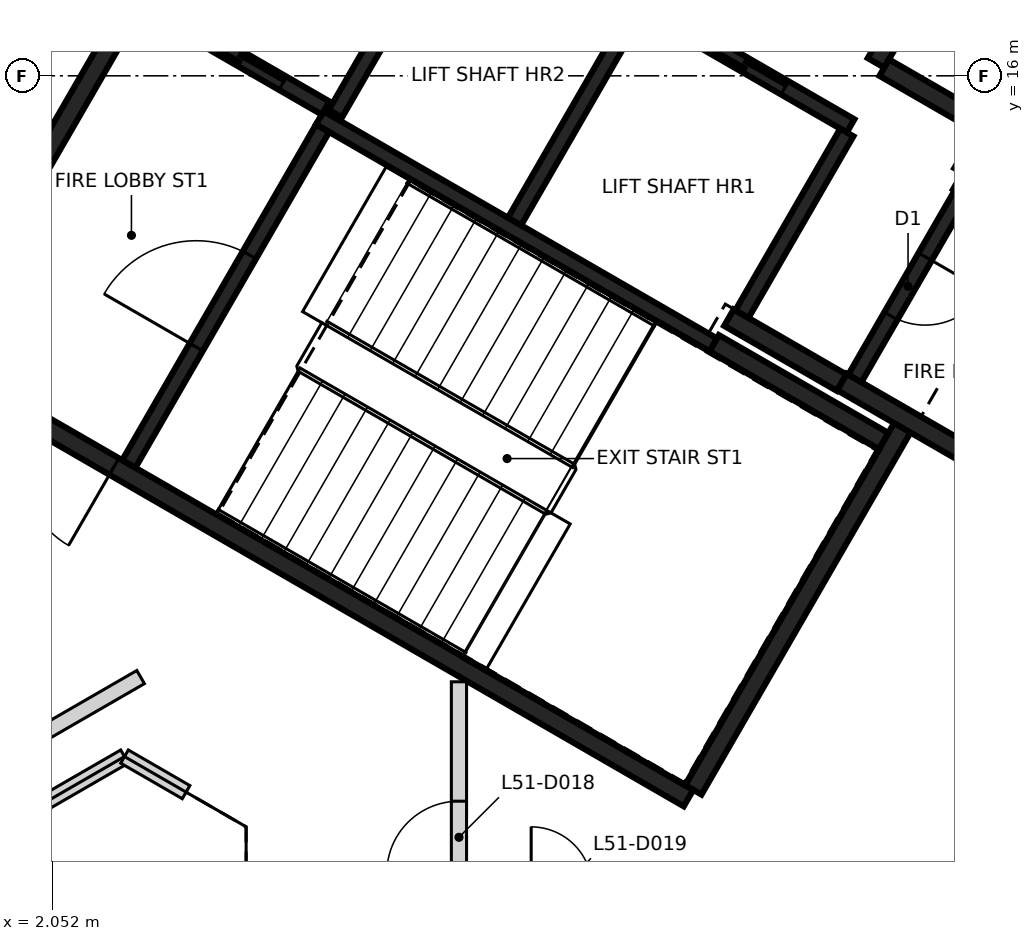
"""IFC4 building model, lengths in metres.
Left out: names, types, materials, properties, quantities, classifications, styles, units other than length and angle.
Written with IfcOpenShell. Run it as: python <this file> out.ifc"""

import sys

from ifc_helpers import new_model, si_unit, direction, frame, frame_2d, origin, place, context, subcontext, project, spatial, rectangle, extrude, element, fill, save


model = new_model("IFC4")
c1 = context("Model", 3, precision=1e-05, world=origin(), true_north=direction((0.0, 1.0)))
c2 = subcontext(c1, "Body", "Model", "MODEL_VIEW")
j1 = project(units=[si_unit("LENGTHUNIT", "METRE"), si_unit("PLANEANGLEUNIT", "RADIAN")], contexts=[c1])
p1 = place(None, origin())
s1 = spatial("IfcSite", under=j1, at=p1, CompositionType="ELEMENT")
p2 = place(p1, origin())
s2 = spatial("IfcBuilding", under=s1, at=p2, CompositionType="ELEMENT")
p3 = place(p2, frame((0.0, 0.0, 204.4)))
s3 = spatial("IfcBuildingStorey", under=s2, at=p3, CompositionType="ELEMENT", Elevation=204.4)
p4 = place(p3, frame((10.42, 6.498, 0.0), z_axis=(0.0, 0.0, 1.0), x_axis=(-0.866021906294, 0.500006057782, 0.0)))
e1 = element("IfcWall", 1, at=p4, inside=s3, PredefinedType="SHEAR", context=c2, shape_type="SweptSolid", body=[
    extrude(rectangle(XDim=11.55, YDim=0.25, at=frame_2d((5.775, 0.0))), origin(), (0.0, 0.0, 1.0), 3.25),
])
p5 = place(p4, frame((10.025, 0.0, 0.0)))
e2 = element("IfcOpeningElement", 2, at=p5, cuts=e1, PredefinedType="OPENING", context=c2, shape_type="SweptSolid", body=[
    extrude(rectangle(XDim=1.2, YDim=2.1, at=frame_2d((0.6, 1.05))), frame((0.0, 0.135, 0.0), z_axis=(0.0, -1.0, 0.0), x_axis=(1.0, 0.0, 0.0)), (0.0, 0.0, 1.0), 0.27),
])
p6 = place(p4, frame((8.725, 0.0, 0.0)))
e3 = element("IfcOpeningElement", 3, at=p6, cuts=e1, PredefinedType="OPENING", context=c2, shape_type="SweptSolid", body=[
    extrude(rectangle(XDim=1.2, YDim=2.1, at=frame_2d((0.6, 1.05))), frame((0.0, 0.135, 0.0), z_axis=(0.0, -1.0, 0.0), x_axis=(1.0, 0.0, 0.0)), (0.0, 0.0, 1.0), 0.27),
])
p7 = place(p3, frame((0.48, 12.381, 0.0), z_axis=(0.0, 0.0, 1.0), x_axis=(0.49999885962, 0.866026062182, 0.0)))
e4 = element("IfcWall", 4, at=p7, inside=s3, PredefinedType="SHEAR", context=c2, shape_type="SweptSolid", body=[
    extrude(rectangle(XDim=5.225, YDim=0.25, at=frame_2d((2.612, 0.0))), origin(), (0.0, 0.0, 1.0), 3.25),
])
p8 = place(p3, frame((13.238, 11.378, 0.0), z_axis=(0.0, 0.0, 1.0), x_axis=(-0.500008851346, -0.866020293397, 0.0)))
e5 = element("IfcWall", 5, at=p8, inside=s3, PredefinedType="SHEAR", context=c2, shape_type="SweptSolid", body=[
    extrude(rectangle(XDim=5.51, YDim=0.25, at=frame_2d((2.755, 0.0))), origin(), (0.0, 0.0, 1.0), 3.25),
])
p9 = place(p3, frame((14.918, 10.54, 0.0), z_axis=(0.0, 0.0, 1.0), x_axis=(-0.866063538972, 0.499933942099, 0.0)))
e6 = element("IfcWall", 6, at=p9, inside=s3, PredefinedType="SHEAR", context=c2, shape_type="SweptSolid", body=[
    extrude(rectangle(XDim=2.865, YDim=0.25, at=frame_2d((1.432, 0.0))), origin(), (0.0, 0.0, 1.0), 3.25),
])
p10 = place(p3, frame((13.963, 14.614, 0.0), z_axis=(0.0, 0.0, 1.0), x_axis=(0.866042235819, -0.499970844928, 0.0)))
e7 = element("IfcWall", 7, at=p10, inside=s3, PredefinedType="SHEAR", context=c2, shape_type="SweptSolid", body=[
    extrude(rectangle(XDim=2.865, YDim=0.25, at=frame_2d((1.432, 0.0))), origin(), (0.0, 0.0, 1.0), 3.25),
])
p11 = place(p3, frame((10.757, 12.481, 0.0), z_axis=(0.0, 0.0, 1.0), x_axis=(0.866022940537, -0.500004266446, 0.0)))
e8 = element("IfcWall", 8, at=p11, inside=s3, PredefinedType="SHEAR", context=c2, shape_type="SweptSolid", body=[
    extrude(rectangle(XDim=2.575, YDim=0.25, at=frame_2d((1.287, 0.0))), origin(), (0.0, 0.0, 1.0), 3.25),
])
p12 = place(p3, frame((13.819, 17.785, 0.0), z_axis=(0.0, 0.0, 1.0), x_axis=(-0.500039802285, -0.866002422705, 0.0)))
e9 = element("IfcWall", 9, at=p12, inside=s3, PredefinedType="SHEAR", context=c2, shape_type="SweptSolid", body=[
    extrude(rectangle(XDim=1.865, YDim=0.25, at=frame_2d((0.932, 0.0))), origin(), (0.0, 0.0, 1.0), 3.25),
])
p13 = place(p3, frame((12.433, 11.964, 0.0), z_axis=(0.0, 0.0, 1.0), x_axis=(-0.866038183914, 0.499977863513, 0.0)))
e10 = element("IfcWall", 10, at=p13, inside=s3, PredefinedType="SHEAR", context=c2, shape_type="SweptSolid", body=[
    extrude(rectangle(XDim=1.71, YDim=0.25, at=frame_2d((0.855, 0.0))), origin(), (0.0, 0.0, 1.0), 3.25),
])
p14 = place(p3, frame((12.995, 16.108, 0.0), z_axis=(0.0, 0.0, 1.0), x_axis=(0.866044474677, -0.49996696679, 0.0)))
e11 = element("IfcWall", 11, at=p14, inside=s3, PredefinedType="SHEAR", context=c2, shape_type="SweptSolid", body=[
    extrude(rectangle(XDim=1.584, YDim=0.25, at=frame_2d((0.792, 0.0))), origin(), (0.0, 0.0, 1.0), 3.25),
])
p15 = place(p3, frame((14.305, 15.207, 0.0), z_axis=(0.0, 0.0, 1.0), x_axis=(-0.499848422343, -0.866112899501, 0.0)))
e12 = element("IfcWall", 12, at=p15, inside=s3, PredefinedType="SHEAR", context=c2, shape_type="SweptSolid", body=[
    extrude(rectangle(XDim=0.559, YDim=0.25, at=frame_2d((0.28, 0.0))), origin(), (0.0, 0.0, 1.0), 3.25),
])
p16 = place(p3, frame((12.552, 15.342, 0.0), z_axis=(0.0, 0.0, 1.0), x_axis=(-0.866030299012, 0.499991521122, 0.0)))
e13 = element("IfcWall", 13, at=p16, inside=s3, PredefinedType="SHEAR", context=c2, shape_type="SweptSolid", body=[
    extrude(rectangle(XDim=6.1, YDim=0.2, at=frame_2d((3.05, 0.0))), origin(), (0.0, 0.0, 1.0), 3.25),
])
p17 = place(p16, frame((1.0, 0.0, 0.0)))
e14 = element("IfcOpeningElement", 14, at=p17, cuts=e13, PredefinedType="OPENING", context=c2, shape_type="SweptSolid", body=[
    extrude(rectangle(XDim=1.2, YDim=2.1, at=frame_2d((0.6, 1.05))), frame((0.0, 0.11, 0.0), z_axis=(0.0, -1.0, 0.0), x_axis=(1.0, 0.0, 0.0)), (0.0, 0.0, 1.0), 0.22),
])
p18 = place(p16, frame((3.982, 0.0, 0.0)))
e15 = element("IfcOpeningElement", 15, at=p18, cuts=e13, PredefinedType="OPENING", context=c2, shape_type="SweptSolid", body=[
    extrude(rectangle(XDim=1.2, YDim=2.1, at=frame_2d((0.6, 1.05))), frame((0.0, 0.11, 0.0), z_axis=(0.0, -1.0, 0.0), x_axis=(1.0, 0.0, 0.0)), (0.0, 0.0, 1.0), 0.22),
])
p19 = place(p3, frame((10.743, 12.46, 0.0), z_axis=(0.0, 0.0, 1.0), x_axis=(-0.866018848283, 0.500011354289, 0.0)))
e16 = element("IfcWall", 16, at=p19, inside=s3, PredefinedType="SHEAR", context=c2, shape_type="SweptSolid", body=[
    extrude(rectangle(XDim=5.974, YDim=0.2, at=frame_2d((2.987, 0.0))), origin(), (0.0, 0.0, 1.0), 3.25),
])
p20 = place(p3, frame((3.057, 10.895, 0.0), z_axis=(0.0, 0.0, 1.0), x_axis=(0.500027839223, 0.866009330205, 0.0)))
e17 = element("IfcWall", 17, at=p20, inside=s3, PredefinedType="SHEAR", context=c2, shape_type="SweptSolid", body=[
    extrude(rectangle(XDim=5.098, YDim=0.2, at=frame_2d((2.549, 0.0))), origin(), (0.0, 0.0, 1.0), 3.25),
])
p21 = place(p20, frame((1.774, 0.0, 0.0)))
e18 = element("IfcOpeningElement", 18, at=p21, cuts=e17, PredefinedType="OPENING", context=c2, shape_type="SweptSolid", body=[
    extrude(rectangle(XDim=1.4, YDim=2.1, at=frame_2d((0.7, 1.05))), frame((0.0, 0.11, 0.0), z_axis=(0.0, -1.0, 0.0), x_axis=(1.0, 0.0, 0.0)), (0.0, 0.0, 1.0), 0.22),
])
p22 = place(p3, frame((8.132, 14.084, 0.0), z_axis=(0.0, 0.0, 1.0), x_axis=(0.500030834389, 0.86600760081, 0.0)))
e19 = element("IfcWall", 19, at=p22, inside=s3, PredefinedType="SHEAR", context=c2, shape_type="SweptSolid", body=[
    extrude(rectangle(XDim=3.198, YDim=0.2, at=frame_2d((1.599, 0.0))), origin(), (0.0, 0.0, 1.0), 3.25),
])
p23 = place(p3, frame((14.008, 14.442, 0.0), z_axis=(0.0, 0.0, 1.0), x_axis=(-0.499986818241, -0.866033014143, 0.0)))
e20 = element("IfcWall", 20, at=p23, inside=s3, PredefinedType="SHEAR", context=c2, shape_type="SweptSolid", body=[
    extrude(rectangle(XDim=2.798, YDim=0.2, at=frame_2d((1.399, 0.0))), origin(), (0.0, 0.0, 1.0), 3.25),
])
p24 = place(p23, frame((0.949, 0.0, 0.0)))
e21 = element("IfcOpeningElement", 21, at=p24, cuts=e20, PredefinedType="OPENING", context=c2, shape_type="SweptSolid", body=[
    extrude(rectangle(XDim=0.9, YDim=2.1, at=frame_2d((0.45, 1.05))), frame((0.0, 0.11, 0.0), z_axis=(0.0, -1.0, 0.0), x_axis=(1.0, 0.0, 0.0)), (0.0, 0.0, 1.0), 0.22),
])
p25 = place(p3, frame((12.502, 15.255, 0.0), z_axis=(0.0, 0.0, 1.0), x_axis=(-0.499965018551, -0.866045599391, 0.0)))
e22 = element("IfcWall", 22, at=p25, inside=s3, PredefinedType="SHEAR", context=c2, shape_type="SweptSolid", body=[
    extrude(rectangle(XDim=2.759, YDim=0.2, at=frame_2d((1.379, 0.0))), origin(), (0.0, 0.0, 1.0), 3.25),
])
p26 = place(p3, frame((7.324, 18.187, 0.0), z_axis=(0.0, 0.0, 1.0), x_axis=(-0.499967891604, -0.866043940782, 0.0)))
e23 = element("IfcWall", 23, at=p26, inside=s3, PredefinedType="SHEAR", context=c2, shape_type="SweptSolid", body=[
    extrude(rectangle(XDim=3.1, YDim=0.2, at=frame_2d((1.55, 0.0))), origin(), (0.0, 0.0, 1.0), 3.25),
])
p27 = place(p3, frame((5.646, 15.576, 0.0), z_axis=(0.0, 0.0, 1.0), x_axis=(-0.866018407898, 0.500012117035, 0.0)))
e24 = element("IfcWall", 24, at=p27, inside=s3, PredefinedType="SHEAR", context=c2, shape_type="SweptSolid", body=[
    extrude(rectangle(XDim=2.651, YDim=0.2, at=frame_2d((1.325, 0.0))), origin(), (0.0, 0.0, 1.0), 3.25),
])
p28 = place(p27, frame((0.652, 0.0, 0.0)))
e25 = element("IfcOpeningElement", 25, at=p28, cuts=e24, PredefinedType="OPENING", context=c2, shape_type="SweptSolid", body=[
    extrude(rectangle(XDim=1.3, YDim=2.1, at=frame_2d((0.65, 1.05))), frame((0.0, 0.11, 0.0), z_axis=(0.0, -1.0, 0.0), x_axis=(1.0, 0.0, 0.0)), (0.0, 0.0, 1.0), 0.22),
])
p29 = place(p3, frame((-4.718, 3.511, 0.0), z_axis=(0.0, 0.0, 1.0), x_axis=(0.865989775611, 0.500061704731, 0.0)))
e26 = element("IfcWall", 26, at=p29, inside=s3, PredefinedType="PARTITIONING", context=c2, shape_type="SweptSolid", body=[
    extrude(rectangle(XDim=9.157, YDim=0.2, at=frame_2d((4.579, 0.0))), origin(), (0.0, 0.0, 1.0), 3.25),
])
p30 = place(p29, frame((4.128, 0.0, 0.0)))
e27 = element("IfcOpeningElement", 27, at=p30, cuts=e26, PredefinedType="OPENING", context=c2, shape_type="SweptSolid", body=[
    extrude(rectangle(XDim=0.9, YDim=2.1, at=frame_2d((0.45, 1.05))), frame((0.0, 0.11, 0.0), z_axis=(0.0, -1.0, 0.0), x_axis=(1.0, 0.0, 0.0)), (0.0, 0.0, 1.0), 0.22),
])
p31 = place(p3, frame((-1.086, 12.65, 0.0), z_axis=(0.0, 0.0, 1.0), x_axis=(0.492552173528, 0.87028291742, 0.0)))
e28 = element("IfcWall", 28, at=p31, inside=s3, PredefinedType="PARTITIONING", context=c2, shape_type="SweptSolid", body=[
    extrude(rectangle(XDim=10.531, YDim=0.2, at=frame_2d((5.266, 0.0))), origin(), (0.0, 0.0, 1.0), 3.25),
])
p32 = place(p31, frame((3.342, 0.0, 0.0)))
e29 = element("IfcOpeningElement", 29, at=p32, cuts=e28, PredefinedType="OPENING", context=c2, shape_type="SweptSolid", body=[
    extrude(rectangle(XDim=0.95, YDim=2.1, at=frame_2d((0.475, 1.05))), frame((0.0, 0.11, 0.0), z_axis=(0.0, -1.0, 0.0), x_axis=(1.0, 0.0, 0.0)), (0.0, 0.0, 1.0), 0.22),
])
p33 = place(p3, frame((7.4, -4.966, 0.0), z_axis=(0.0, 0.0, 1.0), x_axis=(0.0, 1.0, 0.0)))
e30 = element("IfcWall", 30, at=p33, inside=s3, PredefinedType="PARTITIONING", context=c2, shape_type="SweptSolid", body=[
    extrude(rectangle(XDim=12.994, YDim=0.2, at=frame_2d((6.497, 0.0))), origin(), (0.0, 0.0, 1.0), 3.25),
])
p34 = place(p33, frame((0.2, 0.0, 0.0)))
e31 = element("IfcOpeningElement", 31, at=p34, cuts=e30, PredefinedType="OPENING", context=c2, shape_type="SweptSolid", body=[
    extrude(rectangle(XDim=0.95, YDim=2.1, at=frame_2d((0.475, 1.05))), frame((0.0, 0.11, 0.0), z_axis=(0.0, -1.0, 0.0), x_axis=(1.0, 0.0, 0.0)), (0.0, 0.0, 1.0), 0.22),
])
p35 = place(p33, frame((10.473, 0.0, 0.0)))
e32 = element("IfcOpeningElement", 32, at=p35, cuts=e30, PredefinedType="OPENING", context=c2, shape_type="SweptSolid", body=[
    extrude(rectangle(XDim=0.95, YDim=2.1, at=frame_2d((0.475, 1.05))), frame((0.0, 0.11, 0.0), z_axis=(0.0, -1.0, 0.0), x_axis=(1.0, 0.0, 0.0)), (0.0, 0.0, 1.0), 0.22),
])
p36 = place(p3, frame((-4.318, 2.819, 0.0), z_axis=(0.0, 0.0, 1.0), x_axis=(0.866038843867, 0.499976720371, 0.0)))
e33 = element("IfcWall", 33, at=p36, inside=s3, PredefinedType="PARTITIONING", context=c2, shape_type="SweptSolid", body=[
    extrude(rectangle(XDim=8.45, YDim=0.2, at=frame_2d((4.225, 0.0))), origin(), (0.0, 0.0, 1.0), 3.25),
])
p37 = place(p3, frame((3.0, 7.044, 0.0), z_axis=(0.0, 0.0, 1.0), x_axis=(0.865872609263, -0.500264554538, 0.0)))
e34 = element("IfcWall", 34, at=p37, inside=s3, PredefinedType="PARTITIONING", context=c2, shape_type="SweptSolid", body=[
    extrude(rectangle(XDim=0.936, YDim=0.2, at=frame_2d((0.468, 0.0))), origin(), (0.0, 0.0, 1.0), 3.25),
])
p38 = place(p28, origin())
e35 = element("IfcDoor", 35, at=p38, inside=s3, OperationType="SLIDING_TO_LEFT", PredefinedType="DOOR", context=c2, shape_type="SweptSolid", body=[
    extrude(rectangle(XDim=1.3, YDim=2.1, at=frame_2d((0.65, 1.05))), frame((0.0, 0.025, 0.0), z_axis=(0.0, -1.0, 0.0), x_axis=(1.0, 0.0, 0.0)), (0.0, 0.0, 1.0), 0.05),
])
fill(e25, e35)
p39 = place(p17, origin())
e36 = element("IfcDoor", 36, at=p39, inside=s3, OperationType="DOUBLE_DOOR_SLIDING", PredefinedType="DOOR", context=c2, shape_type="SweptSolid", body=[
    extrude(rectangle(XDim=1.2, YDim=2.1, at=frame_2d((0.6, 1.05))), frame((0.0, 0.025, 0.0), z_axis=(0.0, -1.0, 0.0), x_axis=(1.0, 0.0, 0.0)), (0.0, 0.0, 1.0), 0.05),
])
fill(e14, e36)
p40 = place(p6, origin())
e37 = element("IfcDoor", 37, at=p40, inside=s3, OperationType="SINGLE_SWING_RIGHT", PredefinedType="DOOR", context=c2, shape_type="SweptSolid", body=[
    extrude(rectangle(XDim=1.2, YDim=2.1, at=frame_2d((0.6, 1.05))), frame((0.0, 0.025, 0.0), z_axis=(0.0, -1.0, 0.0), x_axis=(1.0, 0.0, 0.0)), (0.0, 0.0, 1.0), 0.05),
])
fill(e3, e37)
p41 = place(p21, origin())
e38 = element("IfcDoor", 38, at=p41, inside=s3, OperationType="SINGLE_SWING_LEFT", PredefinedType="DOOR", context=c2, shape_type="SweptSolid", body=[
    extrude(rectangle(XDim=1.4, YDim=2.1, at=frame_2d((0.7, 1.05))), frame((0.0, 0.025, 0.0), z_axis=(0.0, -1.0, 0.0), x_axis=(1.0, 0.0, 0.0)), (0.0, 0.0, 1.0), 0.05),
])
fill(e18, e38)
p42 = place(p24, origin())
e39 = element("IfcDoor", 39, at=p42, inside=s3, OperationType="SINGLE_SWING_RIGHT", PredefinedType="DOOR", context=c2, shape_type="SweptSolid", body=[
    extrude(rectangle(XDim=0.9, YDim=2.1, at=frame_2d((0.45, 1.05))), frame((0.0, 0.025, 0.0), z_axis=(0.0, -1.0, 0.0), x_axis=(1.0, 0.0, 0.0)), (0.0, 0.0, 1.0), 0.05),
])
fill(e21, e39)
p43 = place(p35, frame((0.95, 0.0, 0.0), z_axis=(0.0, 0.0, 1.0), x_axis=(-1.0, 0.0, 0.0)))
e40 = element("IfcDoor", 40, at=p43, inside=s3, OperationType="SINGLE_SWING_LEFT", PredefinedType="DOOR", context=c2, shape_type="SweptSolid", body=[
    extrude(rectangle(XDim=0.95, YDim=2.1, at=frame_2d((0.475, 1.05))), frame((0.0, 0.025, 0.0), z_axis=(0.0, -1.0, 0.0), x_axis=(1.0, 0.0, 0.0)), (0.0, 0.0, 1.0), 0.05),
])
fill(e32, e40)
save(model, sys.argv[1])
